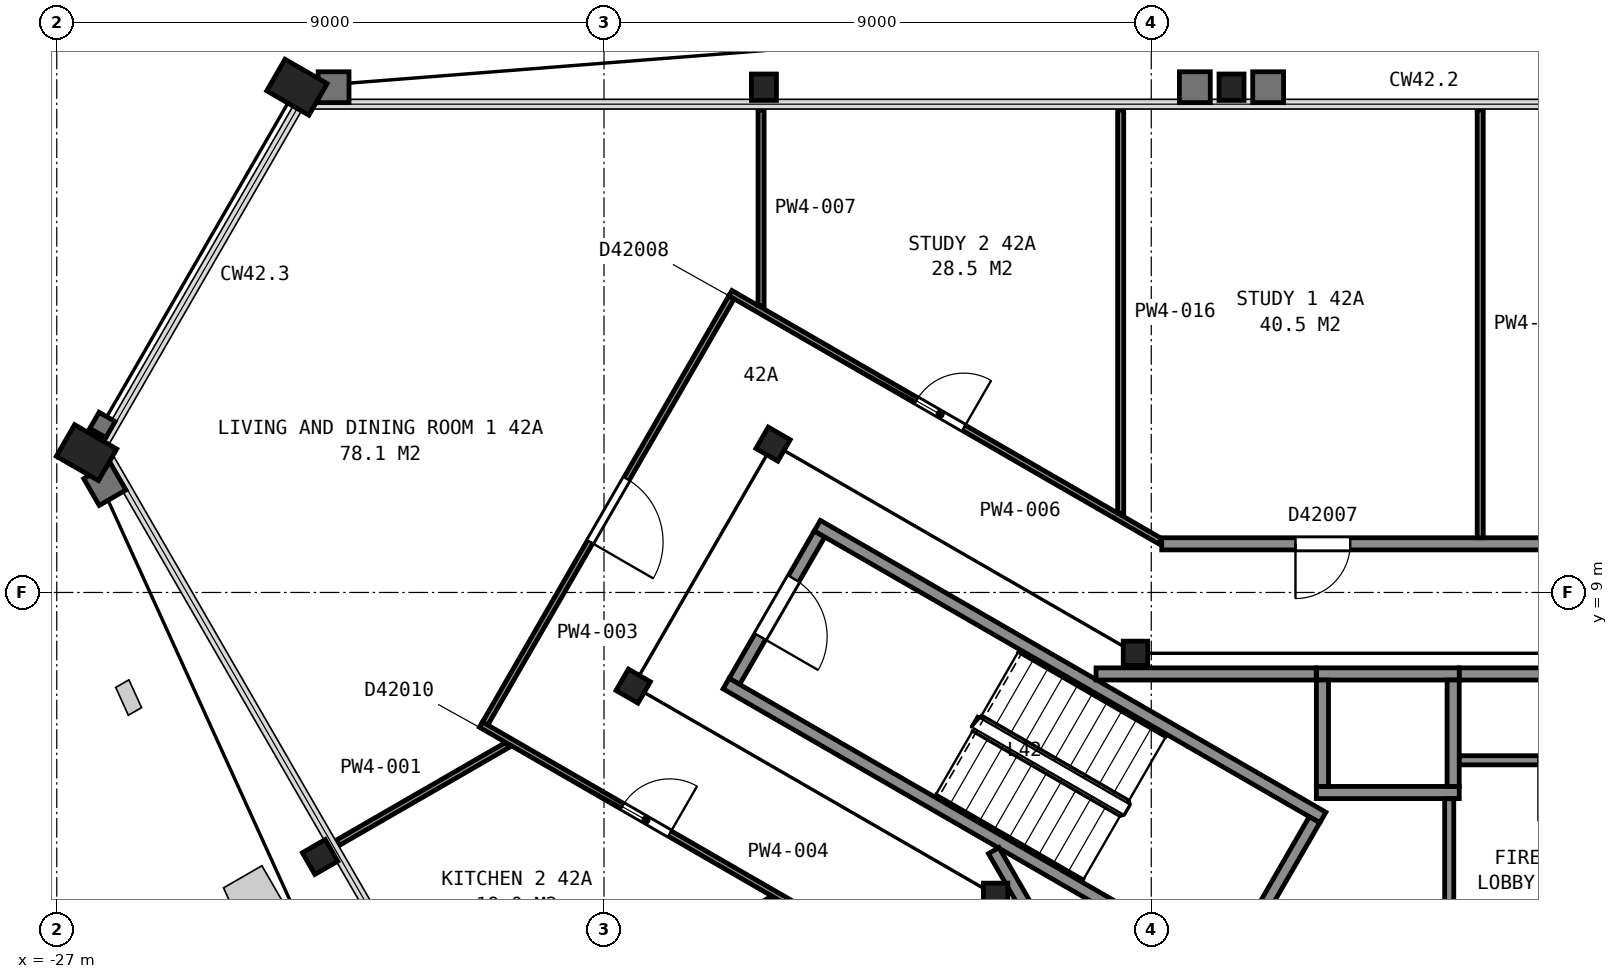
"""IFC4 building model, lengths in metres.
Left out: names, types, materials, properties, quantities, classifications, styles, units other than length and angle.
Written with IfcOpenShell. Run it as: python <this file> out.ifc"""

import sys

from ifc_helpers import new_model, si_unit, direction, frame, frame_2d, origin, origin_2d, place, context, subcontext, project, spatial, rectangle, hollow_rectangle, i_section, extrude, element, fill, save


model = new_model("IFC4")
c1 = context("Model", 3, precision=1e-05, world=origin(), true_north=direction((0.0, 1.0)))
c2 = subcontext(c1, "Body", "Model", "MODEL_VIEW")
j1 = project(units=[si_unit("LENGTHUNIT", "METRE"), si_unit("PLANEANGLEUNIT", "RADIAN")], contexts=[c1])
p1 = place(None, origin())
s1 = spatial("IfcSite", under=j1, at=p1, CompositionType="ELEMENT")
p2 = place(p1, origin())
s2 = spatial("IfcBuilding", under=s1, at=p2, CompositionType="ELEMENT")
p3 = place(p2, frame((0.0, 0.0, 171.0)))
s3 = spatial("IfcBuildingStorey", under=s2, at=p3, CompositionType="ELEMENT", Elevation=171.0)
p4 = place(p3, frame((-7.68, 17.31, 0.0), z_axis=(0.0, 0.0, 1.0), x_axis=(1.0, 0.0, 0.0)))
e1 = element("IfcColumn", 1, at=p4, inside=s3, PredefinedType="COLUMN", context=c2, shape_type="SweptSolid", body=[
    extrude(i_section(OverallWidth=0.411, OverallDepth=0.434, WebThickness=0.036, FlangeThickness=0.057, FilletRadius=0.015, at=origin_2d()), origin(), (0.0, 0.0, 1.0), 3.665),
])
p5 = place(p3, frame((-15.37, 17.31, 0.0), z_axis=(0.0, 0.0, 1.0), x_axis=(1.0, 0.0, 0.0)))
e2 = element("IfcColumn", 2, at=p5, inside=s3, PredefinedType="COLUMN", context=c2, shape_type="SweptSolid", body=[
    extrude(i_section(OverallWidth=0.411, OverallDepth=0.434, WebThickness=0.036, FlangeThickness=0.057, FilletRadius=0.015, at=origin_2d()), origin(), (0.0, 0.0, 1.0), 3.66),
])
for number, where, z_axis, x_axis in (
    (3, (-23.05, 17.31, 0.0), (0.0, 0.0, 1.0), (0.5, 0.866, 0.0)),
    (4, (-26.51, 11.3, 0.0), (0.0, 0.0, 1.0), (0.5, 0.866, 0.0)),
):
    element("IfcColumn", number, at=place(p3, frame(where, z_axis=z_axis, x_axis=x_axis)), inside=s3, PredefinedType="COLUMN", context=c2, shape_type="SweptSolid", body=[
        extrude(hollow_rectangle(XDim=0.6, YDim=0.8, WallThickness=0.05, at=origin_2d()), origin(), (0.0, 0.0, 1.0), 3.635),
    ])
p6 = place(p3, frame((-22.67, 4.65, 0.0), z_axis=(0.0, 0.0, 1.0), x_axis=(-0.5, 0.866025403784, 0.0)))
e5 = element("IfcColumn", 5, at=p6, inside=s3, PredefinedType="COLUMN", context=c2, shape_type="SweptSolid", body=[
    extrude(i_section(OverallWidth=0.411, OverallDepth=0.434, WebThickness=0.036, FlangeThickness=0.057, FilletRadius=0.015, at=origin_2d()), origin(), (0.0, 0.0, 1.0), 3.66),
])
p7 = place(p3, frame((-9.26, 8.0, 0.0), z_axis=(0.0, 0.0, 1.0), x_axis=(1.0, 0.0, 0.0)))
e6 = element("IfcColumn", 6, at=p7, inside=s3, PredefinedType="COLUMN", context=c2, shape_type="SweptSolid", body=[
    extrude(i_section(OverallWidth=0.401, OverallDepth=0.399, WebThickness=0.025, FlangeThickness=0.04, FilletRadius=0.015, at=origin_2d()), origin(), (0.0, 0.0, 1.0), 3.7),
])
for number, where, z_axis, x_axis in (
    (7, (-15.22, 11.44, 0.0), (0.0, 0.0, 1.0), (0.5, 0.866, 0.0)),
    (8, (-17.52, 7.46, 0.0), (0.0, 0.0, 1.0), (0.5, 0.866, 0.0)),
):
    element("IfcColumn", number, at=place(p3, frame(where, z_axis=z_axis, x_axis=x_axis)), inside=s3, PredefinedType="COLUMN", context=c2, shape_type="SweptSolid", body=[
        extrude(i_section(OverallWidth=0.406, OverallDepth=0.417, WebThickness=0.03, FlangeThickness=0.048, FilletRadius=0.015, at=origin_2d()), origin(), (0.0, 0.0, 1.0), 3.7),
    ])
p8 = place(p3, frame((-11.56, 4.02, 0.0), z_axis=(0.0, 0.0, 1.0), x_axis=(1.0, 0.0, 0.0)))
e9 = element("IfcColumn", 9, at=p8, inside=s3, PredefinedType="COLUMN", context=c2, shape_type="SweptSolid", body=[
    extrude(i_section(OverallWidth=0.401, OverallDepth=0.399, WebThickness=0.025, FlangeThickness=0.04, FilletRadius=0.015, at=origin_2d()), origin(), (0.0, 0.0, 1.0), 3.7),
])
p9 = place(p3, frame((-14.455, 9.962, 0.0), z_axis=(0.0, 0.0, 1.0), x_axis=(-0.500049511043, -0.865996816683, 0.0)))
e10 = element("IfcWall", 10, at=p9, inside=s3, PredefinedType="PARTITIONING", context=c2, shape_type="SweptSolid", body=[
    extrude(rectangle(XDim=2.8, YDim=0.2, at=frame_2d((1.4, 0.0))), origin(), (0.0, 0.0, 1.0), 3.45),
])
p10 = place(p9, frame((0.85, 0.0, 0.0)))
e11 = element("IfcOpeningElement", 11, at=p10, cuts=e10, PredefinedType="OPENING", context=c2, shape_type="SweptSolid", body=[
    extrude(rectangle(XDim=1.1, YDim=2.1, at=frame_2d((0.55, 1.05))), frame((0.0, 0.11, 0.0), z_axis=(0.0, -1.0, 0.0), x_axis=(1.0, 0.0, 0.0)), (0.0, 0.0, 1.0), 0.22),
])
for number, where, z_axis, x_axis in (
    (12, (-7.678, 2.701, 0.0), (0.0, 0.0, 1.0), (-0.866, 0.5, 0.0)),
    (13, (-6.178, 5.299, 0.0), (0.0, 0.0, 1.0), (-0.866, 0.5, 0.0)),
):
    element("IfcWall", number, at=place(p3, frame(where, z_axis=z_axis, x_axis=x_axis)), inside=s3, PredefinedType="PARTITIONING", context=c2, shape_type="SweptSolid", body=[
        extrude(rectangle(XDim=9.6, YDim=0.2, at=frame_2d((4.8, 0.0))), origin(), (0.0, 0.0, 1.0), 3.45),
    ])
p11 = place(p3, frame((-6.315, 5.262, 0.0), z_axis=(0.0, 0.0, 1.0), x_axis=(-0.500049511043, -0.865996816683, 0.0)))
e14 = element("IfcWall", 14, at=p11, inside=s3, PredefinedType="PARTITIONING", context=c2, shape_type="SweptSolid", body=[
    extrude(rectangle(XDim=2.8, YDim=0.2, at=frame_2d((1.4, 0.0))), origin(), (0.0, 0.0, 1.0), 3.45),
])
for number, where, z_axis, x_axis in (
    (15, (-6.285, 5.71, 0.0), (0.0, 0.0, 1.0), (1.0, 0.0, 0.0)),
    (16, (-6.285, 7.66, 0.0), (0.0, 0.0, 1.0), (1.0, 0.0, 0.0)),
):
    element("IfcWall", number, at=place(p3, frame(where, z_axis=z_axis, x_axis=x_axis)), inside=s3, PredefinedType="PARTITIONING", context=c2, shape_type="SweptSolid", body=[
        extrude(rectangle(XDim=2.35, YDim=0.2, at=frame_2d((1.175, 0.0))), origin(), (0.0, 0.0, 1.0), 3.7),
    ])
for number, where, z_axis, x_axis in (
    (17, (-4.035, 5.81, 0.0), (0.0, 0.0, 1.0), (0.0, 1.0, 0.0)),
    (18, (-6.185, 5.81, 0.0), (0.0, 0.0, 1.0), (0.0, 1.0, 0.0)),
):
    element("IfcWall", number, at=place(p3, frame(where, z_axis=z_axis, x_axis=x_axis)), inside=s3, PredefinedType="PARTITIONING", context=c2, shape_type="SweptSolid", body=[
        extrude(rectangle(XDim=1.75, YDim=0.2, at=frame_2d((0.875, 0.0))), origin(), (0.0, 0.0, 1.0), 3.7),
    ])
p12 = place(p3, frame((-11.591, 4.755, 0.0), z_axis=(0.0, 0.0, 1.0), x_axis=(0.500043977787, -0.866000011708, 0.0)))
e19 = element("IfcWall", 19, at=p12, inside=s3, PredefinedType="PARTITIONING", context=c2, shape_type="SweptSolid", body=[
    extrude(rectangle(XDim=6.617, YDim=0.2, at=frame_2d((3.308, 0.0))), origin(), (0.0, 0.0, 1.0), 3.45),
])
p13 = place(p12, frame((3.695, 0.0, 0.0)))
e20 = element("IfcOpeningElement", 20, at=p13, cuts=e19, PredefinedType="OPENING", context=c2, shape_type="SweptSolid", body=[
    extrude(rectangle(XDim=1.8, YDim=2.1, at=frame_2d((0.9, 1.05))), frame((0.0, 0.11, 0.0), z_axis=(0.0, -1.0, 0.0), x_axis=(1.0, 0.0, 0.0)), (0.0, 0.0, 1.0), 0.22),
])
p14 = place(p3, frame((-9.908, 7.66, 0.0), z_axis=(0.0, 0.0, 1.0), x_axis=(1.0, 0.0, 0.0)))
e21 = element("IfcWall", 21, at=p14, inside=s3, PredefinedType="PARTITIONING", context=c2, shape_type="SweptSolid", body=[
    extrude(rectangle(XDim=3.621, YDim=0.2, at=frame_2d((1.811, 0.0))), origin(), (0.0, 0.0, 1.0), 3.45),
])
p15 = place(p3, frame((-4.1, 2.085, 0.0), z_axis=(0.0, 0.0, 1.0), x_axis=(0.0, 1.0, 0.0)))
e22 = element("IfcWall", 22, at=p15, inside=s3, PredefinedType="PARTITIONING", context=c2, shape_type="SweptSolid", body=[
    extrude(rectangle(XDim=3.523, YDim=0.15, at=frame_2d((1.761, 0.0))), origin(), (0.0, 0.0, 1.0), 3.45),
])
p16 = place(p3, frame((-3.933, 6.24, 0.0), z_axis=(0.0, 0.0, 1.0), x_axis=(1.0, 0.0, 0.0)))
e23 = element("IfcWall", 23, at=p16, inside=s3, PredefinedType="PARTITIONING", context=c2, shape_type="SweptSolid", body=[
    extrude(rectangle(XDim=3.538, YDim=0.15, at=frame_2d((1.769, 0.0))), origin(), (0.0, 0.0, 1.0), 3.45),
])
p17 = place(p16, frame((1.3, 0.0, 0.0)))
e24 = element("IfcOpeningElement", 24, at=p17, cuts=e23, PredefinedType="OPENING", context=c2, shape_type="SweptSolid", body=[
    extrude(rectangle(XDim=1.0, YDim=2.1, at=frame_2d((0.5, 1.05))), frame((0.0, 0.085, 0.0), z_axis=(0.0, -1.0, 0.0), x_axis=(1.0, 0.0, 0.0)), (0.0, 0.0, 1.0), 0.17),
])
p18 = place(p3, frame((-3.933, 7.66, 0.0), z_axis=(0.0, 0.0, 1.0), x_axis=(1.0, 0.0, 0.0)))
e25 = element("IfcWall", 25, at=p18, inside=s3, PredefinedType="PARTITIONING", context=c2, shape_type="SweptSolid", body=[
    extrude(rectangle(XDim=13.841, YDim=0.2, at=frame_2d((6.92, 0.0))), origin(), (0.0, 0.0, 1.0), 3.45),
])
p19 = place(p3, frame((-22.375, 4.885, 0.0), z_axis=(0.0, 0.0, 1.0), x_axis=(0.866164079783, 0.499759729163, 0.0)))
e26 = element("IfcWall", 26, at=p19, inside=s3, PredefinedType="PARTITIONING", context=c2, shape_type="SweptSolid", body=[
    extrude(rectangle(XDim=3.213, YDim=0.1, at=frame_2d((1.606, 0.0))), origin(), (0.0, 0.0, 1.0), 2.713),
])
p20 = place(p3, frame((-20.187, 1.094, 0.0), z_axis=(0.0, 0.0, 1.0), x_axis=(0.866060256018, 0.499939629302, 0.0)))
e27 = element("IfcWall", 27, at=p20, inside=s3, PredefinedType="PARTITIONING", context=c2, shape_type="SweptSolid", body=[
    extrude(rectangle(XDim=5.741, YDim=0.1, at=frame_2d((2.871, 0.0))), origin(), (0.0, 0.0, 1.0), 2.713),
])
p21 = place(p3, frame((-19.955, 6.844, 0.0), z_axis=(0.0, 0.0, 1.0), x_axis=(0.500415732313, 0.865785247537, 0.0)))
e28 = element("IfcWall", 28, at=p21, inside=s3, PredefinedType="PARTITIONING", context=c2, shape_type="SweptSolid", body=[
    extrude(rectangle(XDim=8.097, YDim=0.1, at=frame_2d((4.049, 0.0))), origin(), (0.0, 0.0, 1.0), 2.713),
])
p22 = place(p21, frame((3.45, 0.0, 0.0)))
e29 = element("IfcOpeningElement", 29, at=p22, cuts=e28, PredefinedType="OPENING", context=c2, shape_type="SweptSolid", body=[
    extrude(rectangle(XDim=1.2, YDim=2.1, at=frame_2d((0.6, 1.05))), frame((0.0, 0.06, 0.0), z_axis=(0.0, -1.0, 0.0), x_axis=(1.0, 0.0, 0.0)), (0.0, 0.0, 1.0), 0.12),
])
p23 = place(p3, frame((-12.952, 2.744, 0.0), z_axis=(0.0, 0.0, 1.0), x_axis=(-0.86608949446, 0.499888975259, 0.0)))
e30 = element("IfcWall", 30, at=p23, inside=s3, PredefinedType="PARTITIONING", context=c2, shape_type="SweptSolid", body=[
    extrude(rectangle(XDim=8.165, YDim=0.1, at=frame_2d((4.083, 0.0))), origin(), (0.0, 0.0, 1.0), 2.713),
])
p24 = place(p23, frame((4.581, 0.0, 0.0)))
e31 = element("IfcOpeningElement", 31, at=p24, cuts=e30, PredefinedType="OPENING", context=c2, shape_type="SweptSolid", body=[
    extrude(rectangle(XDim=0.9, YDim=2.1, at=frame_2d((0.45, 1.05))), frame((0.0, 0.06, 0.0), z_axis=(0.0, -1.0, 0.0), x_axis=(1.0, 0.0, 0.0)), (0.0, 0.0, 1.0), 0.12),
])
p25 = place(p23, frame((0.776, 0.0, 0.0)))
e32 = element("IfcOpeningElement", 32, at=p25, cuts=e30, PredefinedType="OPENING", context=c2, shape_type="SweptSolid", body=[
    extrude(rectangle(XDim=0.9, YDim=2.1, at=frame_2d((0.45, 1.05))), frame((0.0, 0.06, 0.0), z_axis=(0.0, -1.0, 0.0), x_axis=(1.0, 0.0, 0.0)), (0.0, 0.0, 1.0), 0.12),
])
p26 = place(p3, frame((-15.921, 13.923, 0.0), z_axis=(0.0, 0.0, 1.0), x_axis=(0.866088973199, -0.499889878377, 0.0)))
e33 = element("IfcWall", 33, at=p26, inside=s3, PredefinedType="PARTITIONING", context=c2, shape_type="SweptSolid", body=[
    extrude(rectangle(XDim=8.163, YDim=0.1, at=frame_2d((4.082, 0.0))), origin(), (0.0, 0.0, 1.0), 2.713),
])
p27 = place(p26, frame((3.532, 0.0, 0.0)))
e34 = element("IfcOpeningElement", 34, at=p27, cuts=e33, PredefinedType="OPENING", context=c2, shape_type="SweptSolid", body=[
    extrude(rectangle(XDim=0.9, YDim=2.1, at=frame_2d((0.45, 1.05))), frame((0.0, 0.06, 0.0), z_axis=(0.0, -1.0, 0.0), x_axis=(1.0, 0.0, 0.0)), (0.0, 0.0, 1.0), 0.12),
])
p28 = place(p3, frame((-15.417, 13.719, 0.0), z_axis=(0.0, 0.0, 1.0), x_axis=(0.0, 1.0, 0.0)))
e35 = element("IfcWall", 35, at=p28, inside=s3, PredefinedType="PARTITIONING", context=c2, shape_type="SweptSolid", body=[
    extrude(rectangle(XDim=3.217, YDim=0.1, at=frame_2d((1.608, 0.0))), origin(), (0.0, 0.0, 1.0), 2.713),
])
p29 = place(p3, frame((-9.503, 10.306, 0.0), z_axis=(0.0, 0.0, 1.0), x_axis=(0.0, 1.0, 0.0)))
e36 = element("IfcWall", 36, at=p29, inside=s3, PredefinedType="PARTITIONING", context=c2, shape_type="SweptSolid", body=[
    extrude(rectangle(XDim=6.629, YDim=0.1, at=frame_2d((3.315, 0.0))), origin(), (0.0, 0.0, 1.0), 2.713),
])
p30 = place(p3, frame((-8.828, 9.8, 0.0), z_axis=(0.0, 0.0, 1.0), x_axis=(1.0, 0.0, 0.0)))
e37 = element("IfcWall", 37, at=p30, inside=s3, PredefinedType="PARTITIONING", context=c2, shape_type="SweptSolid", body=[
    extrude(rectangle(XDim=17.656, YDim=0.2, at=frame_2d((8.828, 0.0))), origin(), (0.0, 0.0, 1.0), 2.713),
])
p31 = place(p30, frame((14.864, 0.0, 0.0)))
e38 = element("IfcOpeningElement", 38, at=p31, cuts=e37, PredefinedType="OPENING", context=c2, shape_type="SweptSolid", body=[
    extrude(rectangle(XDim=0.9, YDim=2.1, at=frame_2d((0.45, 1.05))), frame((0.0, 0.11, 0.0), z_axis=(0.0, -1.0, 0.0), x_axis=(1.0, 0.0, 0.0)), (0.0, 0.0, 1.0), 0.22),
])
p32 = place(p30, frame((6.488, 0.0, 0.0)))
e39 = element("IfcOpeningElement", 39, at=p32, cuts=e37, PredefinedType="OPENING", context=c2, shape_type="SweptSolid", body=[
    extrude(rectangle(XDim=0.9, YDim=2.1, at=frame_2d((0.45, 1.05))), frame((0.0, 0.11, 0.0), z_axis=(0.0, -1.0, 0.0), x_axis=(1.0, 0.0, 0.0)), (0.0, 0.0, 1.0), 0.22),
])
p33 = place(p30, frame((2.2, 0.0, 0.0)))
e40 = element("IfcOpeningElement", 40, at=p33, cuts=e37, PredefinedType="OPENING", context=c2, shape_type="SweptSolid", body=[
    extrude(rectangle(XDim=0.9, YDim=2.1, at=frame_2d((0.45, 1.05))), frame((0.0, 0.11, 0.0), z_axis=(0.0, -1.0, 0.0), x_axis=(1.0, 0.0, 0.0)), (0.0, 0.0, 1.0), 0.22),
])
p34 = place(p3, frame((-3.59, 9.9, 0.0), z_axis=(0.0, 0.0, 1.0), x_axis=(0.0, 1.0, 0.0)))
e41 = element("IfcWall", 41, at=p34, inside=s3, PredefinedType="PARTITIONING", context=c2, shape_type="SweptSolid", body=[
    extrude(rectangle(XDim=7.035, YDim=0.1, at=frame_2d((3.518, 0.0))), origin(), (0.0, 0.0, 1.0), 2.713),
])
p35 = place(p10, origin())
e42 = element("IfcDoor", 42, at=p35, inside=s3, OperationType="SINGLE_SWING_RIGHT", PredefinedType="DOOR", context=c2, shape_type="SweptSolid", body=[
    extrude(rectangle(XDim=1.1, YDim=2.1, at=frame_2d((0.55, 1.05))), frame((0.0, 0.025, 0.0), z_axis=(0.0, -1.0, 0.0), x_axis=(1.0, 0.0, 0.0)), (0.0, 0.0, 1.0), 0.05),
])
fill(e11, e42)
p36 = place(p22, origin())
e43 = element("IfcDoor", 43, at=p36, inside=s3, OperationType="SINGLE_SWING_LEFT", PredefinedType="DOOR", context=c2, shape_type="SweptSolid", body=[
    extrude(rectangle(XDim=1.2, YDim=2.1, at=frame_2d((0.6, 1.05))), frame((0.0, 0.025, 0.0), z_axis=(0.0, -1.0, 0.0), x_axis=(1.0, 0.0, 0.0)), (0.0, 0.0, 1.0), 0.05),
])
fill(e29, e43)
p37 = place(p24, origin())
e44 = element("IfcDoor", 44, at=p37, inside=s3, OperationType="SINGLE_SWING_LEFT", PredefinedType="DOOR", context=c2, shape_type="SweptSolid", body=[
    extrude(rectangle(XDim=0.9, YDim=2.1, at=frame_2d((0.45, 1.05))), frame((0.0, 0.025, 0.0), z_axis=(0.0, -1.0, 0.0), x_axis=(1.0, 0.0, 0.0)), (0.0, 0.0, 1.0), 0.05),
])
fill(e31, e44)
p38 = place(p27, origin())
e45 = element("IfcDoor", 45, at=p38, inside=s3, OperationType="SINGLE_SWING_RIGHT", PredefinedType="DOOR", context=c2, shape_type="SweptSolid", body=[
    extrude(rectangle(XDim=0.9, YDim=2.1, at=frame_2d((0.45, 1.05))), frame((0.0, 0.025, 0.0), z_axis=(0.0, -1.0, 0.0), x_axis=(1.0, 0.0, 0.0)), (0.0, 0.0, 1.0), 0.05),
])
fill(e34, e45)
p39 = place(p33, origin())
e46 = element("IfcDoor", 46, at=p39, inside=s3, OperationType="SINGLE_SWING_LEFT", PredefinedType="DOOR", context=c2, shape_type="SweptSolid", body=[
    extrude(rectangle(XDim=0.9, YDim=2.1, at=frame_2d((0.45, 1.05))), frame((0.0, 0.025, 0.0), z_axis=(0.0, -1.0, 0.0), x_axis=(1.0, 0.0, 0.0)), (0.0, 0.0, 1.0), 0.05),
])
fill(e40, e46)
save(model, sys.argv[1])
